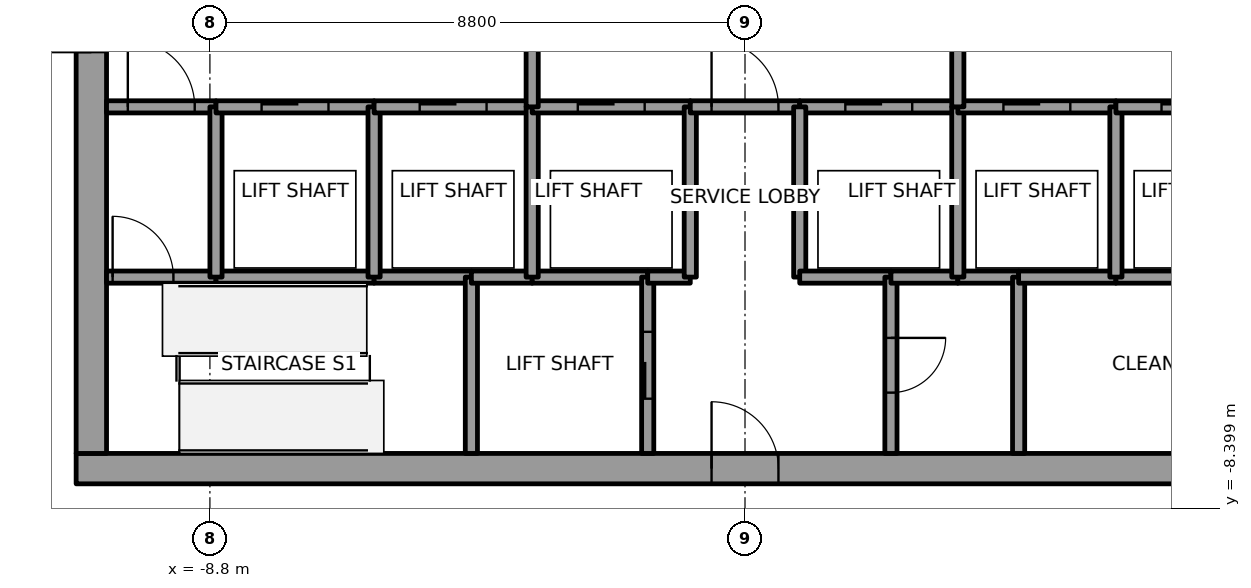
"""IFC4 building model, lengths in metres.
Left out: names, types, materials, properties, quantities, classifications, styles, units other than length and angle.
Written with IfcOpenShell. Run it as: python <this file> out.ifc"""

import sys

from ifc_helpers import new_model, si_unit, direction, frame, frame_2d, origin, place, context, subcontext, project, spatial, rectangle, extrude, element, fill, save


model = new_model("IFC4")
c1 = context("Model", 3, precision=1e-05, world=origin(), true_north=direction((0.0, 1.0)))
c2 = subcontext(c1, "Body", "Model", "MODEL_VIEW")
j1 = project(units=[si_unit("LENGTHUNIT", "METRE"), si_unit("PLANEANGLEUNIT", "RADIAN")], contexts=[c1])
p1 = place(None, origin())
s1 = spatial("IfcSite", under=j1, at=p1, CompositionType="ELEMENT")
p2 = place(p1, origin())
s2 = spatial("IfcBuilding", under=s1, at=p2, CompositionType="ELEMENT")
p3 = place(p2, frame((0.0, 0.0, 299.0)))
s3 = spatial("IfcBuildingStorey", under=s2, at=p3, CompositionType="ELEMENT", Elevation=299.0)
p4 = place(p3, frame((-11.0, -7.75, 0.0), z_axis=(0.0, 0.0, 1.0), x_axis=(1.0, 0.0, 0.0)))
e1 = element("IfcWall", 1, at=p4, inside=s3, PredefinedType="SHEAR", context=c2, shape_type="SweptSolid", body=[
    extrude(rectangle(XDim=22.0, YDim=0.5, at=frame_2d((11.0, 0.0))), origin(), (0.0, 0.0, 1.0), 4.0),
])
p5 = place(p4, frame((10.45, 0.0, 0.0)))
e2 = element("IfcOpeningElement", 2, at=p5, cuts=e1, PredefinedType="OPENING", context=c2, shape_type="SweptSolid", body=[
    extrude(rectangle(XDim=1.1, YDim=2.1, at=frame_2d((0.55, 1.05))), frame((0.0, 0.25, 0.0), z_axis=(0.0, -1.0, 0.0), x_axis=(1.0, 0.0, 0.0)), (0.0, 0.0, 1.0), 0.5),
])
p6 = place(p3, frame((-10.75, -7.5, 0.0), z_axis=(0.0, 0.0, 1.0), x_axis=(0.0, 1.0, 0.0)))
e3 = element("IfcWall", 3, at=p6, inside=s3, PredefinedType="SHEAR", context=c2, shape_type="SweptSolid", body=[
    extrude(rectangle(XDim=15.0, YDim=0.5, at=frame_2d((7.5, 0.0))), origin(), (0.0, 0.0, 1.0), 4.0),
])
p7 = place(p6, frame((6.6, 0.0, 0.0)))
e4 = element("IfcOpeningElement", 4, at=p7, cuts=e3, PredefinedType="OPENING", context=c2, shape_type="SweptSolid", body=[
    extrude(rectangle(XDim=1.8, YDim=2.1, at=frame_2d((0.9, 1.05))), frame((0.0, 0.25, 0.0), z_axis=(0.0, -1.0, 0.0), x_axis=(1.0, 0.0, 0.0)), (0.0, 0.0, 1.0), 0.5),
])
p8 = place(p3, frame((-10.5, -4.6, 0.0), z_axis=(0.0, 0.0, 1.0), x_axis=(1.0, 0.0, 0.0)))
e5 = element("IfcWall", 5, at=p8, inside=s3, PredefinedType="SOLIDWALL", context=c2, shape_type="SweptSolid", body=[
    extrude(rectangle(XDim=1.8, YDim=0.2, at=frame_2d((0.9, 0.0))), origin(), (0.0, 0.0, 1.0), 3.85),
])
p9 = place(p8, frame((0.1, 0.0, 0.0)))
e6 = element("IfcOpeningElement", 6, at=p9, cuts=e5, PredefinedType="OPENING", context=c2, shape_type="SweptSolid", body=[
    extrude(rectangle(XDim=1.0, YDim=2.1, at=frame_2d((0.5, 1.05))), frame((0.0, 0.1, 0.0), z_axis=(0.0, -1.0, 0.0), x_axis=(1.0, 0.0, 0.0)), (0.0, 0.0, 1.0), 0.2),
])
p10 = place(p3, frame((-10.5, -1.8, 0.0), z_axis=(0.0, 0.0, 1.0), x_axis=(1.0, 0.0, 0.0)))
e7 = element("IfcWall", 7, at=p10, inside=s3, PredefinedType="SOLIDWALL", context=c2, shape_type="SweptSolid", body=[
    extrude(rectangle(XDim=1.8, YDim=0.2, at=frame_2d((0.9, 0.0))), origin(), (0.0, 0.0, 1.0), 3.85),
])
p11 = place(p10, frame((0.35, 0.0, 0.0)))
e8 = element("IfcOpeningElement", 8, at=p11, cuts=e7, PredefinedType="OPENING", context=c2, shape_type="SweptSolid", body=[
    extrude(rectangle(XDim=1.1, YDim=2.1, at=frame_2d((0.55, 1.05))), frame((0.0, 0.1, 0.0), z_axis=(0.0, -1.0, 0.0), x_axis=(1.0, 0.0, 0.0)), (0.0, 0.0, 1.0), 0.2),
])
p12 = place(p3, frame((-8.7, -4.6, 0.0), z_axis=(0.0, 0.0, 1.0), x_axis=(1.0, 0.0, 0.0)))
e9 = element("IfcWall", 9, at=p12, inside=s3, PredefinedType="SOLIDWALL", context=c2, shape_type="SweptSolid", body=[
    extrude(rectangle(XDim=2.6, YDim=0.2, at=frame_2d((1.3, 0.0))), origin(), (0.0, 0.0, 1.0), 3.85),
])
p13 = place(p3, frame((-8.7, -4.6, 0.0), z_axis=(0.0, 0.0, 1.0), x_axis=(0.0, 1.0, 0.0)))
e10 = element("IfcWall", 10, at=p13, inside=s3, PredefinedType="SOLIDWALL", context=c2, shape_type="SweptSolid", body=[
    extrude(rectangle(XDim=2.8, YDim=0.2, at=frame_2d((1.4, 0.0))), origin(), (0.0, 0.0, 1.0), 3.85),
])
p14 = place(p3, frame((-8.7, -1.8, 0.0), z_axis=(0.0, 0.0, 1.0), x_axis=(1.0, 0.0, 0.0)))
e11 = element("IfcWall", 11, at=p14, inside=s3, PredefinedType="SOLIDWALL", context=c2, shape_type="SweptSolid", body=[
    extrude(rectangle(XDim=2.6, YDim=0.2, at=frame_2d((1.3, 0.0))), origin(), (0.0, 0.0, 1.0), 3.85),
])
p15 = place(p14, frame((0.75, 0.0, 0.0)))
e12 = element("IfcOpeningElement", 12, at=p15, cuts=e11, PredefinedType="OPENING", context=c2, shape_type="SweptSolid", body=[
    extrude(rectangle(XDim=1.1, YDim=2.1, at=frame_2d((0.55, 1.05))), frame((0.0, 0.1, 0.0), z_axis=(0.0, -1.0, 0.0), x_axis=(1.0, 0.0, 0.0)), (0.0, 0.0, 1.0), 0.2),
])
p16 = place(p3, frame((-6.1, -4.6, 0.0), z_axis=(0.0, 0.0, 1.0), x_axis=(1.0, 0.0, 0.0)))
e13 = element("IfcWall", 13, at=p16, inside=s3, PredefinedType="SOLIDWALL", context=c2, shape_type="SweptSolid", body=[
    extrude(rectangle(XDim=1.6, YDim=0.2, at=frame_2d((0.8, 0.0))), origin(), (0.0, 0.0, 1.0), 3.85),
])
p17 = place(p3, frame((-6.1, -4.6, 0.0), z_axis=(0.0, 0.0, 1.0), x_axis=(0.0, 1.0, 0.0)))
e14 = element("IfcWall", 14, at=p17, inside=s3, PredefinedType="SOLIDWALL", context=c2, shape_type="SweptSolid", body=[
    extrude(rectangle(XDim=2.8, YDim=0.2, at=frame_2d((1.4, 0.0))), origin(), (0.0, 0.0, 1.0), 3.85),
])
p18 = place(p3, frame((-6.1, -1.8, 0.0), z_axis=(0.0, 0.0, 1.0), x_axis=(1.0, 0.0, 0.0)))
e15 = element("IfcWall", 15, at=p18, inside=s3, PredefinedType="SOLIDWALL", context=c2, shape_type="SweptSolid", body=[
    extrude(rectangle(XDim=2.6, YDim=0.2, at=frame_2d((1.3, 0.0))), origin(), (0.0, 0.0, 1.0), 3.85),
])
p19 = place(p18, frame((0.75, 0.0, 0.0)))
e16 = element("IfcOpeningElement", 16, at=p19, cuts=e15, PredefinedType="OPENING", context=c2, shape_type="SweptSolid", body=[
    extrude(rectangle(XDim=1.1, YDim=2.1, at=frame_2d((0.55, 1.05))), frame((0.0, 0.1, 0.0), z_axis=(0.0, -1.0, 0.0), x_axis=(1.0, 0.0, 0.0)), (0.0, 0.0, 1.0), 0.2),
])
p20 = place(p3, frame((-4.5, -4.6, 0.0), z_axis=(0.0, 0.0, 1.0), x_axis=(0.0, -1.0, 0.0)))
e17 = element("IfcWall", 17, at=p20, inside=s3, PredefinedType="SOLIDWALL", context=c2, shape_type="SweptSolid", body=[
    extrude(rectangle(XDim=2.9, YDim=0.2, at=frame_2d((1.45, 0.0))), origin(), (0.0, 0.0, 1.0), 3.85),
])
p21 = place(p3, frame((-4.5, -4.6, 0.0), z_axis=(0.0, 0.0, 1.0), x_axis=(1.0, 0.0, 0.0)))
e18 = element("IfcWall", 18, at=p21, inside=s3, PredefinedType="SOLIDWALL", context=c2, shape_type="SweptSolid", body=[
    extrude(rectangle(XDim=1.0, YDim=0.2, at=frame_2d((0.5, 0.0))), origin(), (0.0, 0.0, 1.0), 3.85),
])
p22 = place(p3, frame((-3.5, -4.6, 0.0), z_axis=(0.0, 0.0, 1.0), x_axis=(1.0, 0.0, 0.0)))
e19 = element("IfcWall", 19, at=p22, inside=s3, PredefinedType="SOLIDWALL", context=c2, shape_type="SweptSolid", body=[
    extrude(rectangle(XDim=1.9, YDim=0.2, at=frame_2d((0.95, 0.0))), origin(), (0.0, 0.0, 1.0), 3.85),
])
p23 = place(p3, frame((-3.5, -4.6, 0.0), z_axis=(0.0, 0.0, 1.0), x_axis=(0.0, 1.0, 0.0)))
e20 = element("IfcWall", 20, at=p23, inside=s3, PredefinedType="SOLIDWALL", context=c2, shape_type="SweptSolid", body=[
    extrude(rectangle(XDim=2.8, YDim=0.2, at=frame_2d((1.4, 0.0))), origin(), (0.0, 0.0, 1.0), 3.85),
])
p24 = place(p3, frame((-3.5, -1.8, 0.0), z_axis=(0.0, 0.0, 1.0), x_axis=(1.0, 0.0, 0.0)))
e21 = element("IfcWall", 21, at=p24, inside=s3, PredefinedType="SOLIDWALL", context=c2, shape_type="SweptSolid", body=[
    extrude(rectangle(XDim=2.6, YDim=0.2, at=frame_2d((1.3, 0.0))), origin(), (0.0, 0.0, 1.0), 3.85),
])
p25 = place(p24, frame((0.75, 0.0, 0.0)))
e22 = element("IfcOpeningElement", 22, at=p25, cuts=e21, PredefinedType="OPENING", context=c2, shape_type="SweptSolid", body=[
    extrude(rectangle(XDim=1.1, YDim=2.1, at=frame_2d((0.55, 1.05))), frame((0.0, 0.1, 0.0), z_axis=(0.0, -1.0, 0.0), x_axis=(1.0, 0.0, 0.0)), (0.0, 0.0, 1.0), 0.2),
])
p26 = place(p3, frame((-3.5, 1.8, 0.0), z_axis=(0.0, 0.0, 1.0), x_axis=(0.0, -1.0, 0.0)))
e23 = element("IfcWall", 23, at=p26, inside=s3, PredefinedType="SOLIDWALL", context=c2, shape_type="SweptSolid", body=[
    extrude(rectangle(XDim=3.6, YDim=0.2, at=frame_2d((1.8, 0.0))), origin(), (0.0, 0.0, 1.0), 3.85),
])
p27 = place(p26, frame((1.05, 0.0, 0.0)))
e24 = element("IfcOpeningElement", 24, at=p27, cuts=e23, PredefinedType="OPENING", context=c2, shape_type="SweptSolid", body=[
    extrude(rectangle(XDim=1.5, YDim=2.1, at=frame_2d((0.75, 1.05))), frame((0.0, 0.1, 0.0), z_axis=(0.0, -1.0, 0.0), x_axis=(1.0, 0.0, 0.0)), (0.0, 0.0, 1.0), 0.2),
])
p28 = place(p3, frame((-1.6, -7.5, 0.0), z_axis=(0.0, 0.0, 1.0), x_axis=(0.0, 1.0, 0.0)))
e25 = element("IfcWall", 25, at=p28, inside=s3, PredefinedType="SOLIDWALL", context=c2, shape_type="SweptSolid", body=[
    extrude(rectangle(XDim=2.9, YDim=0.2, at=frame_2d((1.45, 0.0))), origin(), (0.0, 0.0, 1.0), 3.85),
])
p29 = place(p28, frame((0.9, 0.0, 0.0)))
e26 = element("IfcOpeningElement", 26, at=p29, cuts=e25, PredefinedType="OPENING", context=c2, shape_type="SweptSolid", body=[
    extrude(rectangle(XDim=1.1, YDim=2.1, at=frame_2d((0.55, 1.05))), frame((0.0, 0.1, 0.0), z_axis=(0.0, -1.0, 0.0), x_axis=(1.0, 0.0, 0.0)), (0.0, 0.0, 1.0), 0.2),
])
p30 = place(p3, frame((-1.6, -4.6, 0.0), z_axis=(0.0, 0.0, 1.0), x_axis=(1.0, 0.0, 0.0)))
e27 = element("IfcWall", 27, at=p30, inside=s3, PredefinedType="SOLIDWALL", context=c2, shape_type="SweptSolid", body=[
    extrude(rectangle(XDim=0.7, YDim=0.2, at=frame_2d((0.35, 0.0))), origin(), (0.0, 0.0, 1.0), 3.85),
])
p31 = place(p3, frame((-0.9, -4.6, 0.0), z_axis=(0.0, 0.0, 1.0), x_axis=(0.0, 1.0, 0.0)))
e28 = element("IfcWall", 28, at=p31, inside=s3, PredefinedType="SOLIDWALL", context=c2, shape_type="SweptSolid", body=[
    extrude(rectangle(XDim=2.8, YDim=0.2, at=frame_2d((1.4, 0.0))), origin(), (0.0, 0.0, 1.0), 3.85),
])
p32 = place(p3, frame((-0.9, -1.8, 0.0), z_axis=(0.0, 0.0, 1.0), x_axis=(1.0, 0.0, 0.0)))
e29 = element("IfcWall", 29, at=p32, inside=s3, PredefinedType="SOLIDWALL", context=c2, shape_type="SweptSolid", body=[
    extrude(rectangle(XDim=1.8, YDim=0.2, at=frame_2d((0.9, 0.0))), origin(), (0.0, 0.0, 1.0), 3.85),
])
p33 = place(p32, frame((0.35, 0.0, 0.0)))
e30 = element("IfcOpeningElement", 30, at=p33, cuts=e29, PredefinedType="OPENING", context=c2, shape_type="SweptSolid", body=[
    extrude(rectangle(XDim=1.1, YDim=2.1, at=frame_2d((0.55, 1.05))), frame((0.0, 0.1, 0.0), z_axis=(0.0, -1.0, 0.0), x_axis=(1.0, 0.0, 0.0)), (0.0, 0.0, 1.0), 0.2),
])
p34 = place(p3, frame((0.9, -1.8, 0.0), z_axis=(0.0, 0.0, 1.0), x_axis=(1.0, 0.0, 0.0)))
e31 = element("IfcWall", 31, at=p34, inside=s3, PredefinedType="SOLIDWALL", context=c2, shape_type="SweptSolid", body=[
    extrude(rectangle(XDim=2.6, YDim=0.2, at=frame_2d((1.3, 0.0))), origin(), (0.0, 0.0, 1.0), 3.85),
])
p35 = place(p34, frame((0.75, 0.0, 0.0)))
e32 = element("IfcOpeningElement", 32, at=p35, cuts=e31, PredefinedType="OPENING", context=c2, shape_type="SweptSolid", body=[
    extrude(rectangle(XDim=1.1, YDim=2.1, at=frame_2d((0.55, 1.05))), frame((0.0, 0.1, 0.0), z_axis=(0.0, -1.0, 0.0), x_axis=(1.0, 0.0, 0.0)), (0.0, 0.0, 1.0), 0.2),
])
p36 = place(p3, frame((0.9, -1.8, 0.0), z_axis=(0.0, 0.0, 1.0), x_axis=(0.0, -1.0, 0.0)))
e33 = element("IfcWall", 33, at=p36, inside=s3, PredefinedType="SOLIDWALL", context=c2, shape_type="SweptSolid", body=[
    extrude(rectangle(XDim=2.8, YDim=0.2, at=frame_2d((1.4, 0.0))), origin(), (0.0, 0.0, 1.0), 3.85),
])
p37 = place(p3, frame((0.9, -4.6, 0.0), z_axis=(0.0, 0.0, 1.0), x_axis=(1.0, 0.0, 0.0)))
e34 = element("IfcWall", 34, at=p37, inside=s3, PredefinedType="SOLIDWALL", context=c2, shape_type="SweptSolid", body=[
    extrude(rectangle(XDim=1.5, YDim=0.2, at=frame_2d((0.75, 0.0))), origin(), (0.0, 0.0, 1.0), 3.85),
])
p38 = place(p3, frame((2.4, -4.6, 0.0), z_axis=(0.0, 0.0, 1.0), x_axis=(0.0, -1.0, 0.0)))
e35 = element("IfcWall", 35, at=p38, inside=s3, PredefinedType="SOLIDWALL", context=c2, shape_type="SweptSolid", body=[
    extrude(rectangle(XDim=2.9, YDim=0.2, at=frame_2d((1.45, 0.0))), origin(), (0.0, 0.0, 1.0), 3.85),
])
p39 = place(p38, frame((1.0, 0.0, 0.0)))
e36 = element("IfcOpeningElement", 36, at=p39, cuts=e35, PredefinedType="OPENING", context=c2, shape_type="SweptSolid", body=[
    extrude(rectangle(XDim=0.9, YDim=2.1, at=frame_2d((0.45, 1.05))), frame((0.0, 0.1, 0.0), z_axis=(0.0, -1.0, 0.0), x_axis=(1.0, 0.0, 0.0)), (0.0, 0.0, 1.0), 0.2),
])
p40 = place(p3, frame((3.5, -4.6, 0.0), z_axis=(0.0, 0.0, 1.0), x_axis=(-1.0, 0.0, 0.0)))
e37 = element("IfcWall", 37, at=p40, inside=s3, PredefinedType="SOLIDWALL", context=c2, shape_type="SweptSolid", body=[
    extrude(rectangle(XDim=1.1, YDim=0.2, at=frame_2d((0.55, 0.0))), origin(), (0.0, 0.0, 1.0), 3.85),
])
p41 = place(p3, frame((4.5, -4.6, 0.0), z_axis=(0.0, 0.0, 1.0), x_axis=(-1.0, 0.0, 0.0)))
e38 = element("IfcWall", 38, at=p41, inside=s3, PredefinedType="SOLIDWALL", context=c2, shape_type="SweptSolid", body=[
    extrude(rectangle(XDim=1.0, YDim=0.2, at=frame_2d((0.5, 0.0))), origin(), (0.0, 0.0, 1.0), 3.85),
])
p42 = place(p3, frame((3.5, -4.6, 0.0), z_axis=(0.0, 0.0, 1.0), x_axis=(0.0, 1.0, 0.0)))
e39 = element("IfcWall", 39, at=p42, inside=s3, PredefinedType="SOLIDWALL", context=c2, shape_type="SweptSolid", body=[
    extrude(rectangle(XDim=2.8, YDim=0.2, at=frame_2d((1.4, 0.0))), origin(), (0.0, 0.0, 1.0), 3.85),
])
p43 = place(p3, frame((3.5, -1.8, 0.0), z_axis=(0.0, 0.0, 1.0), x_axis=(1.0, 0.0, 0.0)))
e40 = element("IfcWall", 40, at=p43, inside=s3, PredefinedType="SOLIDWALL", context=c2, shape_type="SweptSolid", body=[
    extrude(rectangle(XDim=2.6, YDim=0.2, at=frame_2d((1.3, 0.0))), origin(), (0.0, 0.0, 1.0), 3.85),
])
p44 = place(p43, frame((0.75, 0.0, 0.0)))
e41 = element("IfcOpeningElement", 41, at=p44, cuts=e40, PredefinedType="OPENING", context=c2, shape_type="SweptSolid", body=[
    extrude(rectangle(XDim=1.1, YDim=2.1, at=frame_2d((0.55, 1.05))), frame((0.0, 0.1, 0.0), z_axis=(0.0, -1.0, 0.0), x_axis=(1.0, 0.0, 0.0)), (0.0, 0.0, 1.0), 0.2),
])
p45 = place(p3, frame((3.5, -1.8, 0.0), z_axis=(0.0, 0.0, 1.0), x_axis=(0.0, 1.0, 0.0)))
e42 = element("IfcWall", 42, at=p45, inside=s3, PredefinedType="SOLIDWALL", context=c2, shape_type="SweptSolid", body=[
    extrude(rectangle(XDim=3.6, YDim=0.2, at=frame_2d((1.8, 0.0))), origin(), (0.0, 0.0, 1.0), 3.85),
])
p46 = place(p45, frame((1.05, 0.0, 0.0)))
e43 = element("IfcOpeningElement", 43, at=p46, cuts=e42, PredefinedType="OPENING", context=c2, shape_type="SweptSolid", body=[
    extrude(rectangle(XDim=1.5, YDim=2.1, at=frame_2d((0.75, 1.05))), frame((0.0, 0.1, 0.0), z_axis=(0.0, -1.0, 0.0), x_axis=(1.0, 0.0, 0.0)), (0.0, 0.0, 1.0), 0.2),
])
p47 = place(p3, frame((4.5, -4.6, 0.0), z_axis=(0.0, 0.0, 1.0), x_axis=(0.0, -1.0, 0.0)))
e44 = element("IfcWall", 44, at=p47, inside=s3, PredefinedType="SOLIDWALL", context=c2, shape_type="SweptSolid", body=[
    extrude(rectangle(XDim=2.9, YDim=0.2, at=frame_2d((1.45, 0.0))), origin(), (0.0, 0.0, 1.0), 3.85),
])
p48 = place(p3, frame((6.1, -4.6, 0.0), z_axis=(0.0, 0.0, 1.0), x_axis=(-1.0, 0.0, 0.0)))
e45 = element("IfcWall", 45, at=p48, inside=s3, PredefinedType="SOLIDWALL", context=c2, shape_type="SweptSolid", body=[
    extrude(rectangle(XDim=1.6, YDim=0.2, at=frame_2d((0.8, 0.0))), origin(), (0.0, 0.0, 1.0), 3.85),
])
p49 = place(p3, frame((8.7, -4.6, 0.0), z_axis=(0.0, 0.0, 1.0), x_axis=(-1.0, 0.0, 0.0)))
e46 = element("IfcWall", 46, at=p49, inside=s3, PredefinedType="SOLIDWALL", context=c2, shape_type="SweptSolid", body=[
    extrude(rectangle(XDim=2.6, YDim=0.2, at=frame_2d((1.3, 0.0))), origin(), (0.0, 0.0, 1.0), 3.85),
])
p50 = place(p3, frame((6.1, -4.6, 0.0), z_axis=(0.0, 0.0, 1.0), x_axis=(0.0, 1.0, 0.0)))
e47 = element("IfcWall", 47, at=p50, inside=s3, PredefinedType="SOLIDWALL", context=c2, shape_type="SweptSolid", body=[
    extrude(rectangle(XDim=2.8, YDim=0.2, at=frame_2d((1.4, 0.0))), origin(), (0.0, 0.0, 1.0), 3.85),
])
p51 = place(p3, frame((6.1, -1.8, 0.0), z_axis=(0.0, 0.0, 1.0), x_axis=(1.0, 0.0, 0.0)))
e48 = element("IfcWall", 48, at=p51, inside=s3, PredefinedType="SOLIDWALL", context=c2, shape_type="SweptSolid", body=[
    extrude(rectangle(XDim=2.6, YDim=0.2, at=frame_2d((1.3, 0.0))), origin(), (0.0, 0.0, 1.0), 3.85),
])
p52 = place(p51, frame((0.75, 0.0, 0.0)))
e49 = element("IfcOpeningElement", 49, at=p52, cuts=e48, PredefinedType="OPENING", context=c2, shape_type="SweptSolid", body=[
    extrude(rectangle(XDim=1.1, YDim=2.1, at=frame_2d((0.55, 1.05))), frame((0.0, 0.1, 0.0), z_axis=(0.0, -1.0, 0.0), x_axis=(1.0, 0.0, 0.0)), (0.0, 0.0, 1.0), 0.2),
])
p53 = place(p15, origin())
e50 = element("IfcDoor", 50, at=p53, inside=s3, OperationType="SLIDING_TO_LEFT", PredefinedType="DOOR", context=c2, shape_type="SweptSolid", body=[
    extrude(rectangle(XDim=1.1, YDim=2.1, at=frame_2d((0.55, 1.05))), frame((0.0, 0.025, 0.0), z_axis=(0.0, -1.0, 0.0), x_axis=(1.0, 0.0, 0.0)), (0.0, 0.0, 1.0), 0.05),
])
fill(e12, e50)
p54 = place(p19, origin())
e51 = element("IfcDoor", 51, at=p54, inside=s3, OperationType="SLIDING_TO_RIGHT", PredefinedType="DOOR", context=c2, shape_type="SweptSolid", body=[
    extrude(rectangle(XDim=1.1, YDim=2.1, at=frame_2d((0.55, 1.05))), frame((0.0, 0.025, 0.0), z_axis=(0.0, -1.0, 0.0), x_axis=(1.0, 0.0, 0.0)), (0.0, 0.0, 1.0), 0.05),
])
fill(e16, e51)
p55 = place(p25, origin())
e52 = element("IfcDoor", 52, at=p55, inside=s3, OperationType="SLIDING_TO_LEFT", PredefinedType="DOOR", context=c2, shape_type="SweptSolid", body=[
    extrude(rectangle(XDim=1.1, YDim=2.1, at=frame_2d((0.55, 1.05))), frame((0.0, 0.025, 0.0), z_axis=(0.0, -1.0, 0.0), x_axis=(1.0, 0.0, 0.0)), (0.0, 0.0, 1.0), 0.05),
])
fill(e22, e52)
p56 = place(p35, origin())
e53 = element("IfcDoor", 53, at=p56, inside=s3, OperationType="SLIDING_TO_LEFT", PredefinedType="DOOR", context=c2, shape_type="SweptSolid", body=[
    extrude(rectangle(XDim=1.1, YDim=2.1, at=frame_2d((0.55, 1.05))), frame((0.0, 0.025, 0.0), z_axis=(0.0, -1.0, 0.0), x_axis=(1.0, 0.0, 0.0)), (0.0, 0.0, 1.0), 0.05),
])
fill(e32, e53)
p57 = place(p44, origin())
e54 = element("IfcDoor", 54, at=p57, inside=s3, OperationType="SLIDING_TO_LEFT", PredefinedType="DOOR", context=c2, shape_type="SweptSolid", body=[
    extrude(rectangle(XDim=1.1, YDim=2.1, at=frame_2d((0.55, 1.05))), frame((0.0, 0.025, 0.0), z_axis=(0.0, -1.0, 0.0), x_axis=(1.0, 0.0, 0.0)), (0.0, 0.0, 1.0), 0.05),
])
fill(e41, e54)
p58 = place(p52, origin())
e55 = element("IfcDoor", 55, at=p58, inside=s3, OperationType="SLIDING_TO_LEFT", PredefinedType="DOOR", context=c2, shape_type="SweptSolid", body=[
    extrude(rectangle(XDim=1.1, YDim=2.1, at=frame_2d((0.55, 1.05))), frame((0.0, 0.025, 0.0), z_axis=(0.0, -1.0, 0.0), x_axis=(1.0, 0.0, 0.0)), (0.0, 0.0, 1.0), 0.05),
])
fill(e49, e55)
p59 = place(p29, origin())
e56 = element("IfcDoor", 56, at=p59, inside=s3, OperationType="SLIDING_TO_LEFT", PredefinedType="DOOR", context=c2, shape_type="SweptSolid", body=[
    extrude(rectangle(XDim=1.1, YDim=2.1, at=frame_2d((0.55, 1.05))), frame((0.0, 0.025, 0.0), z_axis=(0.0, -1.0, 0.0), x_axis=(1.0, 0.0, 0.0)), (0.0, 0.0, 1.0), 0.05),
])
fill(e26, e56)
p60 = place(p11, origin())
e57 = element("IfcDoor", 57, at=p60, inside=s3, OperationType="SINGLE_SWING_RIGHT", PredefinedType="DOOR", context=c2, shape_type="SweptSolid", body=[
    extrude(rectangle(XDim=1.1, YDim=2.1, at=frame_2d((0.55, 1.05))), frame((0.0, 0.025, 0.0), z_axis=(0.0, -1.0, 0.0), x_axis=(1.0, 0.0, 0.0)), (0.0, 0.0, 1.0), 0.05),
])
fill(e8, e57)
p61 = place(p33, origin())
e58 = element("IfcDoor", 58, at=p61, inside=s3, OperationType="SINGLE_SWING_LEFT", PredefinedType="DOOR", context=c2, shape_type="SweptSolid", body=[
    extrude(rectangle(XDim=1.1, YDim=2.1, at=frame_2d((0.55, 1.05))), frame((0.0, 0.025, 0.0), z_axis=(0.0, -1.0, 0.0), x_axis=(1.0, 0.0, 0.0)), (0.0, 0.0, 1.0), 0.05),
])
fill(e30, e58)
p62 = place(p9, origin())
e59 = element("IfcDoor", 59, at=p62, inside=s3, OperationType="SINGLE_SWING_LEFT", PredefinedType="DOOR", context=c2, shape_type="SweptSolid", body=[
    extrude(rectangle(XDim=1.0, YDim=2.1, at=frame_2d((0.5, 1.05))), frame((0.0, 0.025, 0.0), z_axis=(0.0, -1.0, 0.0), x_axis=(1.0, 0.0, 0.0)), (0.0, 0.0, 1.0), 0.05),
])
fill(e6, e59)
p63 = place(p39, origin())
e60 = element("IfcDoor", 60, at=p63, inside=s3, OperationType="SINGLE_SWING_RIGHT", PredefinedType="DOOR", context=c2, shape_type="SweptSolid", body=[
    extrude(rectangle(XDim=0.9, YDim=2.1, at=frame_2d((0.45, 1.05))), frame((0.0, 0.025, 0.0), z_axis=(0.0, -1.0, 0.0), x_axis=(1.0, 0.0, 0.0)), (0.0, 0.0, 1.0), 0.05),
])
fill(e36, e60)
p64 = place(p7, origin())
e61 = element("IfcDoor", 61, at=p64, inside=s3, OperationType="DOUBLE_DOOR_SINGLE_SWING", PredefinedType="DOOR", context=c2, shape_type="SweptSolid", body=[
    extrude(rectangle(XDim=1.8, YDim=2.1, at=frame_2d((0.9, 1.05))), frame((0.0, 0.025, 0.0), z_axis=(0.0, -1.0, 0.0), x_axis=(1.0, 0.0, 0.0)), (0.0, 0.0, 1.0), 0.05),
])
fill(e4, e61)
p65 = place(p5, origin())
e62 = element("IfcDoor", 62, at=p65, inside=s3, OperationType="SINGLE_SWING_LEFT", PredefinedType="DOOR", context=c2, shape_type="SweptSolid", body=[
    extrude(rectangle(XDim=1.1, YDim=2.1, at=frame_2d((0.55, 1.05))), frame((0.0, 0.025, 0.0), z_axis=(0.0, -1.0, 0.0), x_axis=(1.0, 0.0, 0.0)), (0.0, 0.0, 1.0), 0.05),
])
fill(e2, e62)
save(model, sys.argv[1])
